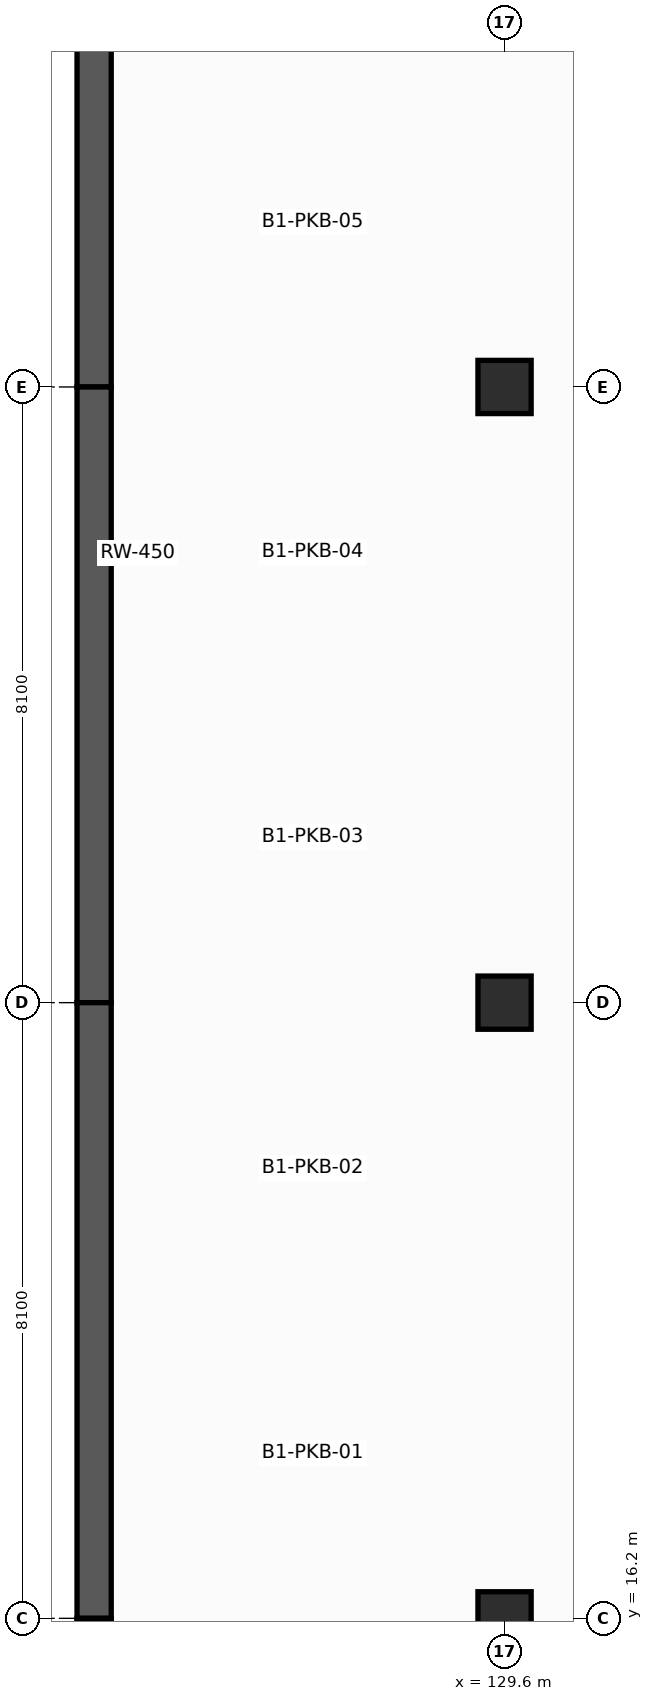
"""IFC4 building model, lengths in metres.
Left out: names, types, materials, properties, quantities, classifications, styles, units other than length and angle.
Written with IfcOpenShell. Run it as: python <this file> out.ifc"""

import sys

from ifc_helpers import new_model, si_unit, direction, frame, frame_2d, origin, origin_2d, place, context, subcontext, project, spatial, rectangle, extrude, element, save


model = new_model("IFC4")
c1 = context("Model", 3, precision=1e-05, world=origin(), true_north=direction((0.0, 1.0)))
c2 = subcontext(c1, "Body", "Model", "MODEL_VIEW")
j1 = project(units=[si_unit("LENGTHUNIT", "METRE"), si_unit("PLANEANGLEUNIT", "RADIAN")], contexts=[c1])
p1 = place(None, origin())
s1 = spatial("IfcSite", under=j1, at=p1, CompositionType="ELEMENT")
p2 = place(p1, origin())
s2 = spatial("IfcBuilding", under=s1, at=p2, CompositionType="ELEMENT")
p3 = place(p2, frame((0.0, 0.0, -5.4)))
s3 = spatial("IfcBuildingStorey", under=s2, at=p3, CompositionType="ELEMENT", Elevation=-5.4)
for number, where, z_axis, x_axis in (
    (1, (129.6, 16.2, -0.4), (0.0, 0.0, 1.0), (1.0, 0.0, 0.0)),
    (2, (129.6, 24.3, -0.4), (0.0, 0.0, 1.0), (1.0, 0.0, 0.0)),
    (3, (129.6, 32.4, -0.4), (0.0, 0.0, 1.0), (1.0, 0.0, 0.0)),
):
    element("IfcColumn", number, at=place(p3, frame(where, z_axis=z_axis, x_axis=x_axis)), inside=s3, PredefinedType="COLUMN", context=c2, shape_type="SweptSolid", body=[
        extrude(rectangle(XDim=0.7, YDim=0.7, at=origin_2d()), origin(), (0.0, 0.0, 1.0), 5.8),
    ])
p4 = place(p3, frame((124.2, 40.5, 0.0), z_axis=(0.0, 0.0, 1.0), x_axis=(0.0, -1.0, 0.0)))
e4 = element("IfcWall", 4, at=p4, inside=s3, PredefinedType="USERDEFINED", context=c2, shape_type="SweptSolid", body=[
    extrude(rectangle(XDim=8.1, YDim=0.45, at=frame_2d((4.05, 0.0))), origin(), (0.0, 0.0, 1.0), 5.1),
])
p5 = place(p3, frame((124.2, 32.4, 0.0), z_axis=(0.0, 0.0, 1.0), x_axis=(0.0, -1.0, 0.0)))
e5 = element("IfcWall", 5, at=p5, inside=s3, PredefinedType="USERDEFINED", context=c2, shape_type="SweptSolid", body=[
    extrude(rectangle(XDim=8.1, YDim=0.45, at=frame_2d((4.05, 0.0))), origin(), (0.0, 0.0, 1.0), 5.1),
])
p6 = place(p3, frame((124.2, 24.3, 0.0), z_axis=(0.0, 0.0, 1.0), x_axis=(0.0, -1.0, 0.0)))
e6 = element("IfcWall", 6, at=p6, inside=s3, PredefinedType="USERDEFINED", context=c2, shape_type="SweptSolid", body=[
    extrude(rectangle(XDim=8.1, YDim=0.45, at=frame_2d((4.05, 0.0))), origin(), (0.0, 0.0, 1.0), 5.1),
])
p7 = place(p3, frame((124.2, 16.2, 0.0), z_axis=(0.0, 0.0, 1.0), x_axis=(0.0, -1.0, 0.0)))
e7 = element("IfcWall", 7, at=p7, inside=s3, PredefinedType="USERDEFINED", context=c2, shape_type="SweptSolid", body=[
    extrude(rectangle(XDim=8.1, YDim=0.45, at=frame_2d((4.05, 0.0))), origin(), (0.0, 0.0, 1.0), 5.1),
])
save(model, sys.argv[1])
